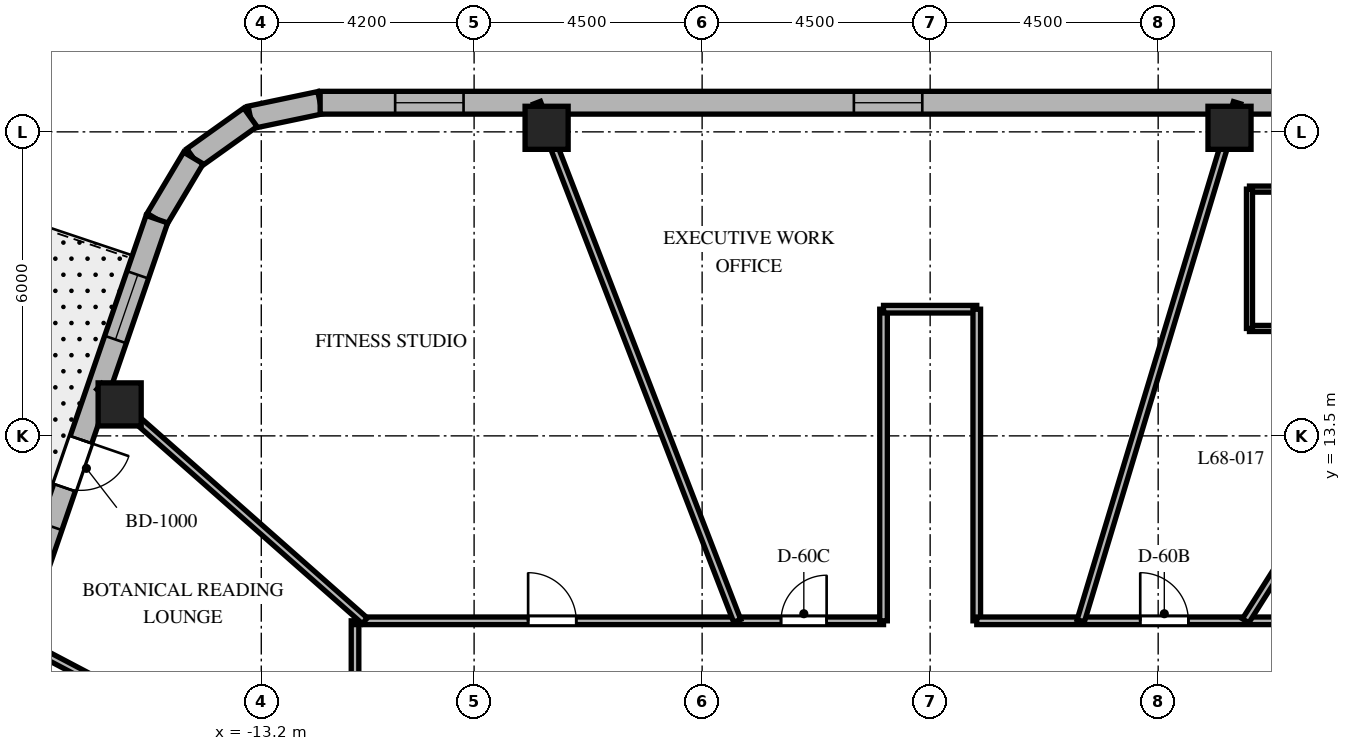
"""IFC4 building model, lengths in metres.
Left out: names, types, materials, properties, quantities, classifications, styles, units other than length and angle.
Written with IfcOpenShell. Run it as: python <this file> out.ifc"""

import sys

from ifc_helpers import new_model, si_unit, direction, frame, frame_2d, origin, origin_2d, place, context, subcontext, project, spatial, rectangle, extrude, element, fill, save


model = new_model("IFC4")
c1 = context("Model", 3, precision=1e-05, world=origin(), true_north=direction((0.0, 1.0)))
c2 = subcontext(c1, "Body", "Model", "MODEL_VIEW")
j1 = project(units=[si_unit("LENGTHUNIT", "METRE"), si_unit("PLANEANGLEUNIT", "RADIAN")], contexts=[c1])
p1 = place(None, origin())
s1 = spatial("IfcSite", under=j1, at=p1, CompositionType="ELEMENT")
p2 = place(p1, origin())
s2 = spatial("IfcBuilding", under=s1, at=p2, CompositionType="ELEMENT")
p3 = place(p2, frame((0.0, 0.0, 273.0)))
s3 = spatial("IfcBuildingStorey", under=s2, at=p3, CompositionType="ELEMENT", Elevation=273.0)
for number, where, z_axis, x_axis in (
    (1, (5.908, 19.58, 0.0), (0.0, 0.0, 1.0), (1.0, 0.0, 0.0)),
    (2, (-7.569, 19.58, 0.0), (0.0, 0.0, 1.0), (1.0, 0.0, 0.0)),
    (3, (-15.995, 14.121, 0.0), (0.0, 0.0, 1.0), (1.0, 0.0, 0.0)),
):
    element("IfcColumn", number, at=place(p3, frame(where, z_axis=z_axis, x_axis=x_axis)), inside=s3, PredefinedType="COLUMN", context=c2, shape_type="SweptSolid", body=[
        extrude(rectangle(XDim=0.85, YDim=0.85, at=origin_2d()), origin(), (0.0, 0.0, 1.0), 3.9),
    ])
p4 = place(p3, frame((-12.038, 20.075, 0.0), z_axis=(0.0, 0.0, 1.0), x_axis=(-0.978750122553, -0.205056571711, 0.0)))
e4 = element("IfcWall", 4, at=p4, inside=s3, PredefinedType="SOLIDWALL", context=c2, shape_type="SweptSolid", body=[
    extrude(rectangle(XDim=1.406, YDim=0.45, at=frame_2d((0.703, 0.0))), origin(), (0.0, 0.0, 1.0), 3.6),
])
p5 = place(p3, frame((-13.415, 19.787, 0.0), z_axis=(0.0, 0.0, 1.0), x_axis=(-0.814055493997, -0.580787097561, 0.0)))
e5 = element("IfcWall", 5, at=p5, inside=s3, PredefinedType="SOLIDWALL", context=c2, shape_type="SweptSolid", body=[
    extrude(rectangle(XDim=1.383, YDim=0.45, at=frame_2d((0.691, 0.0))), origin(), (0.0, 0.0, 1.0), 3.6),
])
p6 = place(p3, frame((-14.54, 18.984, 0.0), z_axis=(0.0, 0.0, 1.0), x_axis=(-0.512374906623, -0.858761873317, 0.0)))
e6 = element("IfcWall", 6, at=p6, inside=s3, PredefinedType="SOLIDWALL", context=c2, shape_type="SweptSolid", body=[
    extrude(rectangle(XDim=1.406, YDim=0.45, at=frame_2d((0.703, 0.0))), origin(), (0.0, 0.0, 1.0), 3.6),
])
p7 = place(p3, frame((10.379, 20.075, 0.0), z_axis=(0.0, 0.0, 1.0), x_axis=(-1.0, 0.0, 0.0)))
e7 = element("IfcWall", 7, at=p7, inside=s3, PredefinedType="SOLIDWALL", context=c2, shape_type="SweptSolid", body=[
    extrude(rectangle(XDim=22.417, YDim=0.45, at=frame_2d((11.208, 0.0))), origin(), (0.0, 0.0, 1.0), 3.6),
])
p8 = place(p7, frame((1.48, 0.0, 0.8)))
e8 = element("IfcOpeningElement", 8, at=p8, cuts=e7, PredefinedType="OPENING", context=c2, shape_type="SweptSolid", body=[
    extrude(rectangle(XDim=1.35, YDim=1.75, at=frame_2d((0.675, 0.875))), frame((0.0, 0.235, 0.0), z_axis=(0.0, -1.0, 0.0), x_axis=(1.0, 0.0, 0.0)), (0.0, 0.0, 1.0), 0.47),
])
p9 = place(p7, frame((10.534, 0.0, 0.8)))
e9 = element("IfcOpeningElement", 9, at=p9, cuts=e7, PredefinedType="OPENING", context=c2, shape_type="SweptSolid", body=[
    extrude(rectangle(XDim=1.35, YDim=1.75, at=frame_2d((0.675, 0.875))), frame((0.0, 0.235, 0.0), z_axis=(0.0, -1.0, 0.0), x_axis=(1.0, 0.0, 0.0)), (0.0, 0.0, 1.0), 0.47),
])
p10 = place(p7, frame((19.587, 0.0, 0.8)))
e10 = element("IfcOpeningElement", 10, at=p10, cuts=e7, PredefinedType="OPENING", context=c2, shape_type="SweptSolid", body=[
    extrude(rectangle(XDim=1.35, YDim=1.75, at=frame_2d((0.675, 0.875))), frame((0.0, 0.235, 0.0), z_axis=(0.0, -1.0, 0.0), x_axis=(1.0, 0.0, 0.0)), (0.0, 0.0, 1.0), 0.47),
])
p11 = place(p3, frame((-15.26, 17.776, 0.0), z_axis=(0.0, 0.0, 1.0), x_axis=(-0.325407437101, -0.945573899745, 0.0)))
e11 = element("IfcWall", 11, at=p11, inside=s3, PredefinedType="SOLIDWALL", context=c2, shape_type="SweptSolid", body=[
    extrude(rectangle(XDim=18.552, YDim=0.45, at=frame_2d((9.276, 0.0))), origin(), (0.0, 0.0, 1.0), 3.6),
])
p12 = place(p11, frame((4.602, 0.0, 0.0)))
e12 = element("IfcOpeningElement", 12, at=p12, cuts=e11, PredefinedType="OPENING", context=c2, shape_type="SweptSolid", body=[
    extrude(rectangle(XDim=1.0, YDim=2.15, at=frame_2d((0.5, 1.075))), frame((0.0, 0.235, 0.0), z_axis=(0.0, -1.0, 0.0), x_axis=(1.0, 0.0, 0.0)), (0.0, 0.0, 1.0), 0.47),
])
p13 = place(p11, frame((1.161, 0.0, 0.8)))
e13 = element("IfcOpeningElement", 13, at=p13, cuts=e11, PredefinedType="OPENING", context=c2, shape_type="SweptSolid", body=[
    extrude(rectangle(XDim=1.35, YDim=1.75, at=frame_2d((0.675, 0.875))), frame((0.0, 0.235, 0.0), z_axis=(0.0, -1.0, 0.0), x_axis=(1.0, 0.0, 0.0)), (0.0, 0.0, 1.0), 0.47),
])
p14 = place(p11, frame((6.412, 0.0, 0.8)))
e14 = element("IfcOpeningElement", 14, at=p14, cuts=e11, PredefinedType="OPENING", context=c2, shape_type="SweptSolid", body=[
    extrude(rectangle(XDim=1.35, YDim=1.75, at=frame_2d((0.675, 0.875))), frame((0.0, 0.235, 0.0), z_axis=(0.0, -1.0, 0.0), x_axis=(1.0, 0.0, 0.0)), (0.0, 0.0, 1.0), 0.47),
])
p15 = place(p11, frame((10.892, 0.0, 0.8)))
e15 = element("IfcOpeningElement", 15, at=p15, cuts=e11, PredefinedType="OPENING", context=c2, shape_type="SweptSolid", body=[
    extrude(rectangle(XDim=1.35, YDim=1.75, at=frame_2d((0.675, 0.875))), frame((0.0, 0.235, 0.0), z_axis=(0.0, -1.0, 0.0), x_axis=(1.0, 0.0, 0.0)), (0.0, 0.0, 1.0), 0.47),
])
p16 = place(p11, frame((15.987, 0.0, 0.8)))
e16 = element("IfcOpeningElement", 16, at=p16, cuts=e11, PredefinedType="OPENING", context=c2, shape_type="SweptSolid", body=[
    extrude(rectangle(XDim=1.35, YDim=1.75, at=frame_2d((0.675, 0.875))), frame((0.0, 0.235, 0.0), z_axis=(0.0, -1.0, 0.0), x_axis=(1.0, 0.0, 0.0)), (0.0, 0.0, 1.0), 0.47),
])
p17 = place(p3, frame((-11.35, 4.4, 0.0), z_axis=(0.0, 0.0, 1.0), x_axis=(0.0, 1.0, 0.0)))
e17 = element("IfcWall", 17, at=p17, inside=s3, PredefinedType="PARTITIONING", context=c2, shape_type="SweptSolid", body=[
    extrude(rectangle(XDim=5.45, YDim=0.15, at=frame_2d((2.725, 0.0))), origin(), (0.0, 0.0, 1.0), 3.09),
])
p18 = place(p17, frame((2.94, 0.0, 0.0)))
e18 = element("IfcOpeningElement", 18, at=p18, cuts=e17, PredefinedType="OPENING", context=c2, shape_type="SweptSolid", body=[
    extrude(rectangle(XDim=0.9, YDim=2.03, at=frame_2d((0.45, 1.015))), frame((0.0, 0.085, 0.0), z_axis=(0.0, -1.0, 0.0), x_axis=(1.0, 0.0, 0.0)), (0.0, 0.0, 1.0), 0.17),
])
p19 = place(p3, frame((-11.35, 9.85, 0.0), z_axis=(0.0, 0.0, 1.0), x_axis=(1.0, 0.0, 0.0)))
e19 = element("IfcWall", 19, at=p19, inside=s3, PredefinedType="PARTITIONING", context=c2, shape_type="SweptSolid", body=[
    extrude(rectangle(XDim=10.43, YDim=0.15, at=frame_2d((5.215, 0.0))), origin(), (0.0, 0.0, 1.0), 3.09),
])
p20 = place(p19, frame((8.407, 0.0, 0.0)))
e20 = element("IfcOpeningElement", 20, at=p20, cuts=e19, PredefinedType="OPENING", context=c2, shape_type="SweptSolid", body=[
    extrude(rectangle(XDim=0.9, YDim=2.03, at=frame_2d((0.45, 1.015))), frame((0.0, 0.085, 0.0), z_axis=(0.0, -1.0, 0.0), x_axis=(1.0, 0.0, 0.0)), (0.0, 0.0, 1.0), 0.17),
])
p21 = place(p19, frame((3.416, 0.0, 0.0)))
e21 = element("IfcOpeningElement", 21, at=p21, cuts=e19, PredefinedType="OPENING", context=c2, shape_type="SweptSolid", body=[
    extrude(rectangle(XDim=0.95, YDim=2.03, at=frame_2d((0.475, 1.015))), frame((0.0, 0.085, 0.0), z_axis=(0.0, -1.0, 0.0), x_axis=(1.0, 0.0, 0.0)), (0.0, 0.0, 1.0), 0.17),
])
p22 = place(p3, frame((-0.92, 9.85, 0.0), z_axis=(0.0, 0.0, 1.0), x_axis=(0.0, 1.0, 0.0)))
e22 = element("IfcWall", 22, at=p22, inside=s3, PredefinedType="PARTITIONING", context=c2, shape_type="SweptSolid", body=[
    extrude(rectangle(XDim=6.15, YDim=0.15, at=frame_2d((3.075, 0.0))), origin(), (0.0, 0.0, 1.0), 3.041),
])
p23 = place(p3, frame((-0.92, 16.0, 0.0), z_axis=(0.0, 0.0, 1.0), x_axis=(1.0, 0.0, 0.0)))
e23 = element("IfcWall", 23, at=p23, inside=s3, PredefinedType="PARTITIONING", context=c2, shape_type="SweptSolid", body=[
    extrude(rectangle(XDim=1.84, YDim=0.15, at=frame_2d((0.92, 0.0))), origin(), (0.0, 0.0, 1.0), 3.6),
])
p24 = place(p3, frame((0.92, 16.0, 0.0), z_axis=(0.0, 0.0, 1.0), x_axis=(0.0, -1.0, 0.0)))
e24 = element("IfcWall", 24, at=p24, inside=s3, PredefinedType="PARTITIONING", context=c2, shape_type="SweptSolid", body=[
    extrude(rectangle(XDim=6.15, YDim=0.15, at=frame_2d((3.075, 0.0))), origin(), (0.0, 0.0, 1.0), 3.041),
])
p25 = place(p3, frame((0.92, 9.85, 0.0), z_axis=(0.0, 0.0, 1.0), x_axis=(1.0, 0.0, 0.0)))
e25 = element("IfcWall", 25, at=p25, inside=s3, PredefinedType="PARTITIONING", context=c2, shape_type="SweptSolid", body=[
    extrude(rectangle(XDim=10.43, YDim=0.15, at=frame_2d((5.215, 0.0))), origin(), (0.0, 0.0, 1.0), 3.09),
])
p26 = place(p25, frame((6.627, 0.0, 0.0)))
e26 = element("IfcOpeningElement", 26, at=p26, cuts=e25, PredefinedType="OPENING", context=c2, shape_type="SweptSolid", body=[
    extrude(rectangle(XDim=0.9, YDim=2.03, at=frame_2d((0.45, 1.015))), frame((0.0, 0.085, 0.0), z_axis=(0.0, -1.0, 0.0), x_axis=(1.0, 0.0, 0.0)), (0.0, 0.0, 1.0), 0.17),
])
p27 = place(p25, frame((3.226, 0.0, 0.0)))
e27 = element("IfcOpeningElement", 27, at=p27, cuts=e25, PredefinedType="OPENING", context=c2, shape_type="SweptSolid", body=[
    extrude(rectangle(XDim=0.95, YDim=2.03, at=frame_2d((0.475, 1.015))), frame((0.0, 0.085, 0.0), z_axis=(0.0, -1.0, 0.0), x_axis=(1.0, 0.0, 0.0)), (0.0, 0.0, 1.0), 0.17),
])
p28 = place(p3, frame((6.226, 9.85, 0.0), z_axis=(0.0, 0.0, 1.0), x_axis=(0.53429711317, 0.845296749584, 0.0)))
e28 = element("IfcWall", 28, at=p28, inside=s3, PredefinedType="PARTITIONING", context=c2, shape_type="SweptSolid", body=[
    extrude(rectangle(XDim=11.174, YDim=0.15, at=frame_2d((5.587, 0.0))), origin(), (0.0, 0.0, 1.0), 2.94),
])
p29 = place(p3, frame((2.972, 9.85, 0.0), z_axis=(0.0, 0.0, 1.0), x_axis=(0.288872169679, 0.957367677324, 0.0)))
e29 = element("IfcWall", 29, at=p29, inside=s3, PredefinedType="PARTITIONING", context=c2, shape_type="SweptSolid", body=[
    extrude(rectangle(XDim=10.68, YDim=0.15, at=frame_2d((5.34, 0.0))), origin(), (0.0, 0.0, 1.0), 2.94),
])
p30 = place(p3, frame((-3.808, 9.85, 0.0), z_axis=(0.0, 0.0, 1.0), x_axis=(-0.360587327934, 0.932725457427, 0.0)))
e30 = element("IfcWall", 30, at=p30, inside=s3, PredefinedType="PARTITIONING", context=c2, shape_type="SweptSolid", body=[
    extrude(rectangle(XDim=10.962, YDim=0.15, at=frame_2d((5.481, 0.0))), origin(), (0.0, 0.0, 1.0), 2.94),
])
p31 = place(p3, frame((-11.157, 9.85, 0.0), z_axis=(0.0, 0.0, 1.0), x_axis=(-0.74966962095, 0.661812253909, 0.0)))
e31 = element("IfcWall", 31, at=p31, inside=s3, PredefinedType="PARTITIONING", context=c2, shape_type="SweptSolid", body=[
    extrude(rectangle(XDim=6.989, YDim=0.15, at=frame_2d((3.494, 0.0))), origin(), (0.0, 0.0, 1.0), 2.94),
])
p32 = place(p3, frame((-11.35, 5.971, 0.0), z_axis=(0.0, 0.0, 1.0), x_axis=(-0.884999439042, 0.465592088523, 0.0)))
e32 = element("IfcWall", 32, at=p32, inside=s3, PredefinedType="PARTITIONING", context=c2, shape_type="SweptSolid", body=[
    extrude(rectangle(XDim=7.628, YDim=0.15, at=frame_2d((3.814, 0.0))), origin(), (0.0, 0.0, 1.0), 2.94),
])
p33 = place(p3, frame((6.302, 15.62, 0.0), z_axis=(0.0, 0.0, 1.0), x_axis=(1.0, 0.0, 0.0)))
e33 = element("IfcWall", 33, at=p33, inside=s3, PredefinedType="PARTITIONING", context=c2, shape_type="SweptSolid", body=[
    extrude(rectangle(XDim=2.6, YDim=0.12, at=frame_2d((1.3, 0.0))), origin(), (0.0, 0.0, 1.0), 3.6),
])
p34 = place(p33, frame((0.875, 0.0, 0.0)))
e34 = element("IfcOpeningElement", 34, at=p34, cuts=e33, PredefinedType="OPENING", context=c2, shape_type="SweptSolid", body=[
    extrude(rectangle(XDim=0.85, YDim=2.03, at=frame_2d((0.425, 1.015))), frame((0.0, 0.07, 0.0), z_axis=(0.0, -1.0, 0.0), x_axis=(1.0, 0.0, 0.0)), (0.0, 0.0, 1.0), 0.14),
])
p35 = place(p3, frame((8.902, 18.37, 0.0), z_axis=(0.0, 0.0, 1.0), x_axis=(-1.0, 0.0, 0.0)))
e35 = element("IfcWall", 35, at=p35, inside=s3, PredefinedType="PARTITIONING", context=c2, shape_type="SweptSolid", body=[
    extrude(rectangle(XDim=2.6, YDim=0.12, at=frame_2d((1.3, 0.0))), origin(), (0.0, 0.0, 1.0), 2.94),
])
p36 = place(p3, frame((6.302, 18.37, 0.0), z_axis=(0.0, 0.0, 1.0), x_axis=(0.0, -1.0, 0.0)))
e36 = element("IfcWall", 36, at=p36, inside=s3, PredefinedType="PARTITIONING", context=c2, shape_type="SweptSolid", body=[
    extrude(rectangle(XDim=2.75, YDim=0.12, at=frame_2d((1.375, 0.0))), origin(), (0.0, 0.0, 1.0), 3.6),
])
p37 = place(p9, origin())
e37 = element("IfcWindow", 37, at=p37, inside=s3, PartitioningType="SINGLE_PANEL", PredefinedType="WINDOW", context=c2, shape_type="SweptSolid", body=[
    extrude(rectangle(XDim=1.35, YDim=1.75, at=frame_2d((0.675, 0.875))), frame((0.0, 0.03, 0.0), z_axis=(0.0, -1.0, 0.0), x_axis=(1.0, 0.0, 0.0)), (0.0, 0.0, 1.0), 0.06),
])
fill(e9, e37)
p38 = place(p10, origin())
e38 = element("IfcWindow", 38, at=p38, inside=s3, PartitioningType="SINGLE_PANEL", PredefinedType="WINDOW", context=c2, shape_type="SweptSolid", body=[
    extrude(rectangle(XDim=1.35, YDim=1.75, at=frame_2d((0.675, 0.875))), frame((0.0, 0.03, 0.0), z_axis=(0.0, -1.0, 0.0), x_axis=(1.0, 0.0, 0.0)), (0.0, 0.0, 1.0), 0.06),
])
fill(e10, e38)
p39 = place(p12, origin())
e39 = element("IfcDoor", 39, at=p39, inside=s3, OperationType="SINGLE_SWING_LEFT", PredefinedType="DOOR", context=c2, shape_type="SweptSolid", body=[
    extrude(rectangle(XDim=1.0, YDim=2.15, at=frame_2d((0.5, 1.075))), frame((0.0, 0.025, 0.0), z_axis=(0.0, -1.0, 0.0), x_axis=(1.0, 0.0, 0.0)), (0.0, 0.0, 1.0), 0.05),
])
fill(e12, e39)
p40 = place(p13, origin())
e40 = element("IfcWindow", 40, at=p40, inside=s3, PartitioningType="SINGLE_PANEL", PredefinedType="WINDOW", context=c2, shape_type="SweptSolid", body=[
    extrude(rectangle(XDim=1.35, YDim=1.75, at=frame_2d((0.675, 0.875))), frame((0.0, 0.03, 0.0), z_axis=(0.0, -1.0, 0.0), x_axis=(1.0, 0.0, 0.0)), (0.0, 0.0, 1.0), 0.06),
])
fill(e13, e40)
p41 = place(p14, origin())
e41 = element("IfcWindow", 41, at=p41, inside=s3, PartitioningType="SINGLE_PANEL", PredefinedType="WINDOW", context=c2, shape_type="SweptSolid", body=[
    extrude(rectangle(XDim=1.35, YDim=1.75, at=frame_2d((0.675, 0.875))), frame((0.0, 0.03, 0.0), z_axis=(0.0, -1.0, 0.0), x_axis=(1.0, 0.0, 0.0)), (0.0, 0.0, 1.0), 0.06),
])
fill(e14, e41)
p42 = place(p27, origin())
e42 = element("IfcDoor", 42, at=p42, inside=s3, OperationType="SINGLE_SWING_LEFT", PredefinedType="DOOR", context=c2, shape_type="SweptSolid", body=[
    extrude(rectangle(XDim=0.95, YDim=2.03, at=frame_2d((0.475, 1.015))), frame((0.0, 0.025, 0.0), z_axis=(0.0, -1.0, 0.0), x_axis=(1.0, 0.0, 0.0)), (0.0, 0.0, 1.0), 0.05),
])
fill(e27, e42)
p43 = place(p20, origin())
e43 = element("IfcDoor", 43, at=p43, inside=s3, OperationType="SINGLE_SWING_RIGHT", PredefinedType="DOOR", context=c2, shape_type="SweptSolid", body=[
    extrude(rectangle(XDim=0.9, YDim=2.03, at=frame_2d((0.45, 1.015))), frame((0.0, 0.025, 0.0), z_axis=(0.0, -1.0, 0.0), x_axis=(1.0, 0.0, 0.0)), (0.0, 0.0, 1.0), 0.05),
])
fill(e20, e43)
p44 = place(p21, origin())
e44 = element("IfcDoor", 44, at=p44, inside=s3, OperationType="SINGLE_SWING_LEFT", PredefinedType="DOOR", context=c2, shape_type="SweptSolid", body=[
    extrude(rectangle(XDim=0.95, YDim=2.03, at=frame_2d((0.475, 1.015))), frame((0.0, 0.025, 0.0), z_axis=(0.0, -1.0, 0.0), x_axis=(1.0, 0.0, 0.0)), (0.0, 0.0, 1.0), 0.05),
])
fill(e21, e44)
save(model, sys.argv[1])
